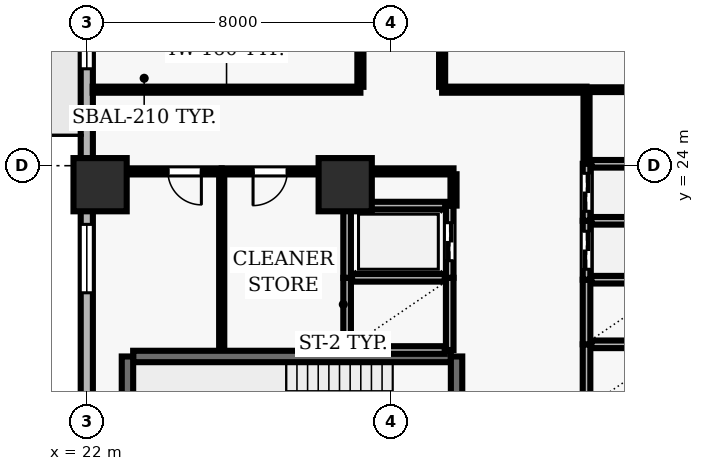
"""IFC4 building model, lengths in metres.
Left out: names, types, materials, properties, quantities, classifications, styles, units other than length and angle.
Written with IfcOpenShell. Run it as: python <this file> out.ifc"""

import sys

from ifc_helpers import new_model, si_unit, direction, frame, frame_2d, origin, origin_2d, place, context, subcontext, project, spatial, rectangle, extrude, element, fill, save


model = new_model("IFC4")
c1 = context("Model", 3, precision=1e-05, world=origin(), true_north=direction((0.0, 1.0)))
c2 = subcontext(c1, "Body", "Model", "MODEL_VIEW")
j1 = project(units=[si_unit("LENGTHUNIT", "METRE"), si_unit("PLANEANGLEUNIT", "RADIAN")], contexts=[c1])
p1 = place(None, origin())
s1 = spatial("IfcSite", under=j1, at=p1, CompositionType="ELEMENT")
p2 = place(p1, origin())
s2 = spatial("IfcBuilding", under=s1, at=p2, CompositionType="ELEMENT")
p3 = place(p2, frame((0.0, 0.0, 89.5)))
s3 = spatial("IfcBuildingStorey", under=s2, at=p3, CompositionType="ELEMENT", Elevation=89.5)
for number, where, z_axis, x_axis in (
    (1, (22.35, 23.5, 0.0), (0.0, 0.0, 1.0), (1.0, 0.0, 0.0)),
    (2, (28.8, 23.5, 0.0), (0.0, 0.0, 1.0), (1.0, 0.0, 0.0)),
):
    element("IfcColumn", number, at=place(p3, frame(where, z_axis=z_axis, x_axis=x_axis)), inside=s3, PredefinedType="COLUMN", context=c2, shape_type="SweptSolid", body=[
        extrude(rectangle(XDim=1.4, YDim=1.4, at=origin_2d()), origin(), (0.0, 0.0, 1.0), 3.9),
    ])
p4 = place(p3, frame((22.0, 51.5, 0.0), z_axis=(0.0, 0.0, 1.0), x_axis=(0.0, -1.0, 0.0)))
e3 = element("IfcWall", 3, at=p4, inside=s3, PredefinedType="SOLIDWALL", context=c2, shape_type="SweptSolid", body=[
    extrude(rectangle(XDim=49.0, YDim=0.32, at=frame_2d((24.5, 0.0))), origin(), (0.0, 0.0, 1.0), 3.64),
])
p5 = place(p4, frame((12.1, 0.0, 0.0)))
e4 = element("IfcOpeningElement", 4, at=p5, cuts=e3, PredefinedType="OPENING", context=c2, shape_type="SweptSolid", body=[
    extrude(rectangle(XDim=1.0, YDim=2.2, at=frame_2d((0.5, 1.1))), frame((0.0, 0.17, 0.0), z_axis=(0.0, -1.0, 0.0), x_axis=(1.0, 0.0, 0.0)), (0.0, 0.0, 1.0), 0.34),
])
p6 = place(p4, frame((1.822, 0.0, 0.9)))
e5 = element("IfcOpeningElement", 5, at=p6, cuts=e3, PredefinedType="OPENING", context=c2, shape_type="SweptSolid", body=[
    extrude(rectangle(XDim=1.8, YDim=2.2, at=frame_2d((0.9, 1.1))), frame((0.0, 0.17, 0.0), z_axis=(0.0, -1.0, 0.0), x_axis=(1.0, 0.0, 0.0)), (0.0, 0.0, 1.0), 0.34),
])
p7 = place(p4, frame((7.717, 0.0, 0.9)))
e6 = element("IfcOpeningElement", 6, at=p7, cuts=e3, PredefinedType="OPENING", context=c2, shape_type="SweptSolid", body=[
    extrude(rectangle(XDim=1.8, YDim=2.2, at=frame_2d((0.9, 1.1))), frame((0.0, 0.17, 0.0), z_axis=(0.0, -1.0, 0.0), x_axis=(1.0, 0.0, 0.0)), (0.0, 0.0, 1.0), 0.34),
])
p8 = place(p4, frame((18.156, 0.0, 0.9)))
e7 = element("IfcOpeningElement", 7, at=p8, cuts=e3, PredefinedType="OPENING", context=c2, shape_type="SweptSolid", body=[
    extrude(rectangle(XDim=1.8, YDim=2.2, at=frame_2d((0.9, 1.1))), frame((0.0, 0.17, 0.0), z_axis=(0.0, -1.0, 0.0), x_axis=(1.0, 0.0, 0.0)), (0.0, 0.0, 1.0), 0.34),
])
p9 = place(p4, frame((23.15, 0.0, 0.9)))
e8 = element("IfcOpeningElement", 8, at=p9, cuts=e3, PredefinedType="OPENING", context=c2, shape_type="SweptSolid", body=[
    extrude(rectangle(XDim=1.8, YDim=2.2, at=frame_2d((0.9, 1.1))), frame((0.0, 0.17, 0.0), z_axis=(0.0, -1.0, 0.0), x_axis=(1.0, 0.0, 0.0)), (0.0, 0.0, 1.0), 0.34),
])
p10 = place(p4, frame((29.044, 0.0, 0.9)))
e9 = element("IfcOpeningElement", 9, at=p10, cuts=e3, PredefinedType="OPENING", context=c2, shape_type="SweptSolid", body=[
    extrude(rectangle(XDim=1.8, YDim=2.2, at=frame_2d((0.9, 1.1))), frame((0.0, 0.17, 0.0), z_axis=(0.0, -1.0, 0.0), x_axis=(1.0, 0.0, 0.0)), (0.0, 0.0, 1.0), 0.34),
])
p11 = place(p4, frame((34.039, 0.0, 0.9)))
e10 = element("IfcOpeningElement", 10, at=p11, cuts=e3, PredefinedType="OPENING", context=c2, shape_type="SweptSolid", body=[
    extrude(rectangle(XDim=1.8, YDim=2.2, at=frame_2d((0.9, 1.1))), frame((0.0, 0.17, 0.0), z_axis=(0.0, -1.0, 0.0), x_axis=(1.0, 0.0, 0.0)), (0.0, 0.0, 1.0), 0.34),
])
p12 = place(p4, frame((39.933, 0.0, 0.9)))
e11 = element("IfcOpeningElement", 11, at=p12, cuts=e3, PredefinedType="OPENING", context=c2, shape_type="SweptSolid", body=[
    extrude(rectangle(XDim=1.8, YDim=2.2, at=frame_2d((0.9, 1.1))), frame((0.0, 0.17, 0.0), z_axis=(0.0, -1.0, 0.0), x_axis=(1.0, 0.0, 0.0)), (0.0, 0.0, 1.0), 0.34),
])
p13 = place(p3, frame((31.58, 18.98, 0.0), z_axis=(0.0, 0.0, 1.0), x_axis=(-1.0, 0.0, 0.0)))
e12 = element("IfcWall", 12, at=p13, inside=s3, PredefinedType="SHEAR", context=c2, shape_type="SweptSolid", body=[
    extrude(rectangle(XDim=8.36, YDim=0.3, at=frame_2d((4.18, 0.0))), origin(), (0.0, 0.0, 1.0), 3.64),
])
p14 = place(p3, frame((23.07, 18.98, 0.0), z_axis=(0.0, 0.0, 1.0), x_axis=(0.0, -1.0, 0.0)))
e13 = element("IfcWall", 13, at=p14, inside=s3, PredefinedType="SHEAR", context=c2, shape_type="SweptSolid", body=[
    extrude(rectangle(XDim=3.51, YDim=0.3, at=frame_2d((1.755, 0.0))), origin(), (0.0, 0.0, 1.0), 3.64),
])
p15 = place(p3, frame((31.73, 15.47, 0.0), z_axis=(0.0, 0.0, 1.0), x_axis=(0.0, 1.0, 0.0)))
e14 = element("IfcWall", 14, at=p15, inside=s3, PredefinedType="SHEAR", context=c2, shape_type="SweptSolid", body=[
    extrude(rectangle(XDim=3.51, YDim=0.3, at=frame_2d((1.755, 0.0))), origin(), (0.0, 0.0, 1.0), 3.64),
])
p16 = place(p15, frame((1.18, 0.0, 0.0)))
e15 = element("IfcOpeningElement", 15, at=p16, cuts=e14, PredefinedType="OPENING", context=c2, shape_type="SweptSolid", body=[
    extrude(rectangle(XDim=1.15, YDim=2.15, at=frame_2d((0.575, 1.075))), frame((0.0, 0.16, 0.0), z_axis=(0.0, -1.0, 0.0), x_axis=(1.0, 0.0, 0.0)), (0.0, 0.0, 1.0), 0.32),
])
p17 = place(p3, frame((35.15, 19.3, 0.0), z_axis=(0.0, 0.0, 1.0), x_axis=(0.0, -1.0, 0.0)))
e16 = element("IfcWall", 16, at=p17, inside=s3, PredefinedType="SOLIDWALL", context=c2, shape_type="SweptSolid", body=[
    extrude(rectangle(XDim=1.7, YDim=0.2, at=frame_2d((0.85, 0.0))), origin(), (0.0, 0.0, 1.0), 3.64),
])
p18 = place(p3, frame((37.42, 19.3, 0.0), z_axis=(0.0, 0.0, 1.0), x_axis=(-1.0, 0.0, 0.0)))
e17 = element("IfcWall", 17, at=p18, inside=s3, PredefinedType="SOLIDWALL", context=c2, shape_type="SweptSolid", body=[
    extrude(rectangle(XDim=2.14, YDim=0.2, at=frame_2d((1.07, 0.0))), origin(), (0.0, 0.0, 1.0), 3.64),
])
p19 = place(p3, frame((35.15, 21.0, 0.0), z_axis=(0.0, 0.0, 1.0), x_axis=(0.0, -1.0, 0.0)))
e18 = element("IfcWall", 18, at=p19, inside=s3, PredefinedType="SOLIDWALL", context=c2, shape_type="SweptSolid", body=[
    extrude(rectangle(XDim=1.7, YDim=0.2, at=frame_2d((0.85, 0.0))), origin(), (0.0, 0.0, 1.0), 3.64),
])
p20 = place(p3, frame((37.42, 21.0, 0.0), z_axis=(0.0, 0.0, 1.0), x_axis=(-1.0, 0.0, 0.0)))
e19 = element("IfcWall", 19, at=p20, inside=s3, PredefinedType="SOLIDWALL", context=c2, shape_type="SweptSolid", body=[
    extrude(rectangle(XDim=2.14, YDim=0.2, at=frame_2d((1.07, 0.0))), origin(), (0.0, 0.0, 1.0), 3.64),
])
for number, where, z_axis, x_axis in (
    (20, (28.85, 21.05, 0.0), (0.0, 0.0, 1.0), (0.0, -1.0, 0.0)),
    (21, (31.55, 19.15, 0.0), (0.0, 0.0, 1.0), (0.0, 1.0, 0.0)),
):
    element("IfcWall", number, at=place(p3, frame(where, z_axis=z_axis, x_axis=x_axis)), inside=s3, PredefinedType="SOLIDWALL", context=c2, shape_type="SweptSolid", body=[
        extrude(rectangle(XDim=1.9, YDim=0.2, at=frame_2d((0.95, 0.0))), origin(), (0.0, 0.0, 1.0), 3.64),
    ])
for number, where, z_axis, x_axis in (
    (22, (28.98, 19.15, 0.0), (0.0, 0.0, 1.0), (1.0, 0.0, 0.0)),
    (23, (31.42, 21.05, 0.0), (0.0, 0.0, 1.0), (-1.0, 0.0, 0.0)),
):
    element("IfcWall", number, at=place(p3, frame(where, z_axis=z_axis, x_axis=x_axis)), inside=s3, PredefinedType="SOLIDWALL", context=c2, shape_type="SweptSolid", body=[
        extrude(rectangle(XDim=2.44, YDim=0.2, at=frame_2d((1.22, 0.0))), origin(), (0.0, 0.0, 1.0), 3.64),
    ])
p21 = place(p3, frame((35.15, 22.55, 0.0), z_axis=(0.0, 0.0, 1.0), x_axis=(0.0, -1.0, 0.0)))
e24 = element("IfcWall", 24, at=p21, inside=s3, PredefinedType="SOLIDWALL", context=c2, shape_type="SweptSolid", body=[
    extrude(rectangle(XDim=1.55, YDim=0.2, at=frame_2d((0.775, 0.0))), origin(), (0.0, 0.0, 1.0), 3.64),
])
p22 = place(p21, frame((0.275, 0.0, 0.0)))
e25 = element("IfcOpeningElement", 25, at=p22, cuts=e24, PredefinedType="OPENING", context=c2, shape_type="SweptSolid", body=[
    extrude(rectangle(XDim=1.0, YDim=2.1, at=frame_2d((0.5, 1.05))), frame((0.0, 0.11, 0.0), z_axis=(0.0, -1.0, 0.0), x_axis=(1.0, 0.0, 0.0)), (0.0, 0.0, 1.0), 0.22),
])
p23 = place(p3, frame((37.42, 22.55, 0.0), z_axis=(0.0, 0.0, 1.0), x_axis=(-1.0, 0.0, 0.0)))
e26 = element("IfcWall", 26, at=p23, inside=s3, PredefinedType="SOLIDWALL", context=c2, shape_type="SweptSolid", body=[
    extrude(rectangle(XDim=2.14, YDim=0.2, at=frame_2d((1.07, 0.0))), origin(), (0.0, 0.0, 1.0), 3.64),
])
p24 = place(p3, frame((35.15, 24.05, 0.0), z_axis=(0.0, 0.0, 1.0), x_axis=(0.0, -1.0, 0.0)))
e27 = element("IfcWall", 27, at=p24, inside=s3, PredefinedType="SOLIDWALL", context=c2, shape_type="SweptSolid", body=[
    extrude(rectangle(XDim=1.5, YDim=0.2, at=frame_2d((0.75, 0.0))), origin(), (0.0, 0.0, 1.0), 3.64),
])
p25 = place(p24, frame((0.25, 0.0, 0.0)))
e28 = element("IfcOpeningElement", 28, at=p25, cuts=e27, PredefinedType="OPENING", context=c2, shape_type="SweptSolid", body=[
    extrude(rectangle(XDim=1.0, YDim=2.1, at=frame_2d((0.5, 1.05))), frame((0.0, 0.11, 0.0), z_axis=(0.0, -1.0, 0.0), x_axis=(1.0, 0.0, 0.0)), (0.0, 0.0, 1.0), 0.22),
])
p26 = place(p3, frame((37.42, 24.05, 0.0), z_axis=(0.0, 0.0, 1.0), x_axis=(-1.0, 0.0, 0.0)))
e29 = element("IfcWall", 29, at=p26, inside=s3, PredefinedType="SOLIDWALL", context=c2, shape_type="SweptSolid", body=[
    extrude(rectangle(XDim=2.14, YDim=0.2, at=frame_2d((1.07, 0.0))), origin(), (0.0, 0.0, 1.0), 3.64),
])
p27 = place(p3, frame((28.85, 22.95, 0.0), z_axis=(0.0, 0.0, 1.0), x_axis=(0.0, -1.0, 0.0)))
e30 = element("IfcWall", 30, at=p27, inside=s3, PredefinedType="SOLIDWALL", context=c2, shape_type="SweptSolid", body=[
    extrude(rectangle(XDim=1.9, YDim=0.2, at=frame_2d((0.95, 0.0))), origin(), (0.0, 0.0, 1.0), 3.64),
])
p28 = place(p3, frame((31.55, 21.05, 0.0), z_axis=(0.0, 0.0, 1.0), x_axis=(0.0, 1.0, 0.0)))
e31 = element("IfcWall", 31, at=p28, inside=s3, PredefinedType="SOLIDWALL", context=c2, shape_type="SweptSolid", body=[
    extrude(rectangle(XDim=1.9, YDim=0.2, at=frame_2d((0.95, 0.0))), origin(), (0.0, 0.0, 1.0), 3.64),
])
p29 = place(p28, frame((0.45, 0.0, 0.0)))
e32 = element("IfcOpeningElement", 32, at=p29, cuts=e31, PredefinedType="OPENING", context=c2, shape_type="SweptSolid", body=[
    extrude(rectangle(XDim=1.0, YDim=2.1, at=frame_2d((0.5, 1.05))), frame((0.0, 0.11, 0.0), z_axis=(0.0, -1.0, 0.0), x_axis=(1.0, 0.0, 0.0)), (0.0, 0.0, 1.0), 0.22),
])
p30 = place(p3, frame((31.43, 22.95, 0.0), z_axis=(0.0, 0.0, 1.0), x_axis=(-1.0, 0.0, 0.0)))
e33 = element("IfcWall", 33, at=p30, inside=s3, PredefinedType="SOLIDWALL", context=c2, shape_type="SweptSolid", body=[
    extrude(rectangle(XDim=2.46, YDim=0.2, at=frame_2d((1.23, 0.0))), origin(), (0.0, 0.0, 1.0), 3.64),
])
p31 = place(p3, frame((25.55, 23.85, 0.0), z_axis=(0.0, 0.0, 1.0), x_axis=(-1.0, 0.0, 0.0)))
e34 = element("IfcWall", 34, at=p31, inside=s3, PredefinedType="PARTITIONING", context=c2, shape_type="SweptSolid", body=[
    extrude(rectangle(XDim=3.35, YDim=0.16, at=frame_2d((1.675, 0.0))), origin(), (0.0, 0.0, 1.0), 3.005),
])
p32 = place(p31, frame((0.535, 0.0, 0.0)))
e35 = element("IfcOpeningElement", 35, at=p32, cuts=e34, PredefinedType="OPENING", context=c2, shape_type="SweptSolid", body=[
    extrude(rectangle(XDim=0.88, YDim=2.1, at=frame_2d((0.44, 1.05))), frame((0.0, 0.09, 0.0), z_axis=(0.0, -1.0, 0.0), x_axis=(1.0, 0.0, 0.0)), (0.0, 0.0, 1.0), 0.18),
])
p33 = place(p3, frame((28.8, 23.85, 0.0), z_axis=(0.0, 0.0, 1.0), x_axis=(-1.0, 0.0, 0.0)))
e36 = element("IfcWall", 36, at=p33, inside=s3, PredefinedType="PARTITIONING", context=c2, shape_type="SweptSolid", body=[
    extrude(rectangle(XDim=3.25, YDim=0.16, at=frame_2d((1.625, 0.0))), origin(), (0.0, 0.0, 1.0), 3.005),
])
p34 = place(p33, frame((1.525, 0.0, 0.0)))
e37 = element("IfcOpeningElement", 37, at=p34, cuts=e36, PredefinedType="OPENING", context=c2, shape_type="SweptSolid", body=[
    extrude(rectangle(XDim=0.9, YDim=2.1, at=frame_2d((0.45, 1.05))), frame((0.0, 0.09, 0.0), z_axis=(0.0, -1.0, 0.0), x_axis=(1.0, 0.0, 0.0)), (0.0, 0.0, 1.0), 0.18),
])
p35 = place(p3, frame((28.8, 23.85, 0.0), z_axis=(0.0, 0.0, 1.0), x_axis=(1.0, 0.0, 0.0)))
e38 = element("IfcWall", 38, at=p35, inside=s3, PredefinedType="PARTITIONING", context=c2, shape_type="SweptSolid", body=[
    extrude(rectangle(XDim=2.85, YDim=0.16, at=frame_2d((1.425, 0.0))), origin(), (0.0, 0.0, 1.0), 3.64),
])
p36 = place(p3, frame((29.2, 26.0, 0.0), z_axis=(0.0, 0.0, 1.0), x_axis=(-1.0, 0.0, 0.0)))
e39 = element("IfcWall", 39, at=p36, inside=s3, PredefinedType="PARTITIONING", context=c2, shape_type="SweptSolid", body=[
    extrude(rectangle(XDim=7.045, YDim=0.16, at=frame_2d((3.522, 0.0))), origin(), (0.0, 0.0, 1.0), 3.64),
])
p37 = place(p3, frame((35.15, 26.0, 0.0), z_axis=(0.0, 0.0, 1.0), x_axis=(-1.0, 0.0, 0.0)))
e40 = element("IfcWall", 40, at=p37, inside=s3, PredefinedType="PARTITIONING", context=c2, shape_type="SweptSolid", body=[
    extrude(rectangle(XDim=3.8, YDim=0.16, at=frame_2d((1.9, 0.0))), origin(), (0.0, 0.0, 1.0), 3.64),
])
p38 = place(p3, frame((35.15, 26.0, 0.0), z_axis=(0.0, 0.0, 1.0), x_axis=(1.0, 0.0, 0.0)))
e41 = element("IfcWall", 41, at=p38, inside=s3, PredefinedType="PARTITIONING", context=c2, shape_type="SweptSolid", body=[
    extrude(rectangle(XDim=2.695, YDim=0.125, at=frame_2d((1.348, 0.0))), origin(), (0.0, 0.0, 1.0), 3.64),
])
p39 = place(p3, frame((25.55, 19.16, 0.0), z_axis=(0.0, 0.0, 1.0), x_axis=(0.0, 1.0, 0.0)))
e42 = element("IfcWall", 42, at=p39, inside=s3, PredefinedType="PARTITIONING", context=c2, shape_type="SweptSolid", body=[
    extrude(rectangle(XDim=4.615, YDim=0.135, at=frame_2d((2.308, 0.0))), origin(), (0.0, 0.0, 1.0), 3.64),
])
p40 = place(p3, frame((28.8, 22.95, 0.0), z_axis=(0.0, 0.0, 1.0), x_axis=(0.0, 1.0, 0.0)))
e43 = element("IfcWall", 43, at=p40, inside=s3, PredefinedType="PARTITIONING", context=c2, shape_type="SweptSolid", body=[
    extrude(rectangle(XDim=0.825, YDim=0.125, at=frame_2d((0.413, 0.0))), origin(), (0.0, 0.0, 1.0), 3.64),
])
p41 = place(p3, frame((29.2, 35.742, 0.0), z_axis=(0.0, 0.0, 1.0), x_axis=(0.0, -1.0, 0.0)))
e44 = element("IfcWall", 44, at=p41, inside=s3, PredefinedType="PARTITIONING", context=c2, shape_type="SweptSolid", body=[
    extrude(rectangle(XDim=9.667, YDim=0.16, at=frame_2d((4.833, 0.0))), origin(), (0.0, 0.0, 1.0), 3.64),
])
p42 = place(p41, frame((4.383, 0.0, 0.0)))
e45 = element("IfcOpeningElement", 45, at=p42, cuts=e44, PredefinedType="OPENING", context=c2, shape_type="SweptSolid", body=[
    extrude(rectangle(XDim=0.9, YDim=2.1, at=frame_2d((0.45, 1.05))), frame((0.0, 0.09, 0.0), z_axis=(0.0, -1.0, 0.0), x_axis=(1.0, 0.0, 0.0)), (0.0, 0.0, 1.0), 0.18),
])
p43 = place(p3, frame((31.35, 26.075, 0.0), z_axis=(0.0, 0.0, 1.0), x_axis=(0.0, 1.0, 0.0)))
e46 = element("IfcWall", 46, at=p43, inside=s3, PredefinedType="PARTITIONING", context=c2, shape_type="SweptSolid", body=[
    extrude(rectangle(XDim=9.667, YDim=0.16, at=frame_2d((4.833, 0.0))), origin(), (0.0, 0.0, 1.0), 3.64),
])
p44 = place(p43, frame((4.383, 0.0, 0.0)))
e47 = element("IfcOpeningElement", 47, at=p44, cuts=e46, PredefinedType="OPENING", context=c2, shape_type="SweptSolid", body=[
    extrude(rectangle(XDim=0.9, YDim=2.1, at=frame_2d((0.45, 1.05))), frame((0.0, 0.09, 0.0), z_axis=(0.0, -1.0, 0.0), x_axis=(1.0, 0.0, 0.0)), (0.0, 0.0, 1.0), 0.18),
])
p45 = place(p3, frame((31.65, 23.775, 0.0), z_axis=(0.0, 0.0, 1.0), x_axis=(0.0, -1.0, 0.0)))
e48 = element("IfcWall", 48, at=p45, inside=s3, PredefinedType="PARTITIONING", context=c2, shape_type="SweptSolid", body=[
    extrude(rectangle(XDim=0.825, YDim=0.16, at=frame_2d((0.413, 0.0))), origin(), (0.0, 0.0, 1.0), 3.64),
])
p46 = place(p3, frame((35.15, 24.07, 0.0), z_axis=(0.0, 0.0, 1.0), x_axis=(0.0, 1.0, 0.0)))
e49 = element("IfcWall", 49, at=p46, inside=s3, PredefinedType="PARTITIONING", context=c2, shape_type="SweptSolid", body=[
    extrude(rectangle(XDim=1.855, YDim=0.16, at=frame_2d((0.927, 0.0))), origin(), (0.0, 0.0, 1.0), 3.64),
])
p47 = place(p9, origin())
e50 = element("IfcWindow", 50, at=p47, inside=s3, PartitioningType="SINGLE_PANEL", PredefinedType="WINDOW", context=c2, shape_type="SweptSolid", body=[
    extrude(rectangle(XDim=1.8, YDim=2.2, at=frame_2d((0.9, 1.1))), frame((0.0, 0.03, 0.0), z_axis=(0.0, -1.0, 0.0), x_axis=(1.0, 0.0, 0.0)), (0.0, 0.0, 1.0), 0.06),
])
fill(e8, e50)
p48 = place(p10, origin())
e51 = element("IfcWindow", 51, at=p48, inside=s3, PartitioningType="SINGLE_PANEL", PredefinedType="WINDOW", context=c2, shape_type="SweptSolid", body=[
    extrude(rectangle(XDim=1.8, YDim=2.2, at=frame_2d((0.9, 1.1))), frame((0.0, 0.03, 0.0), z_axis=(0.0, -1.0, 0.0), x_axis=(1.0, 0.0, 0.0)), (0.0, 0.0, 1.0), 0.06),
])
fill(e9, e51)
p49 = place(p22, origin())
e52 = element("IfcDoor", 52, at=p49, inside=s3, OperationType="DOUBLE_DOOR_SLIDING", PredefinedType="DOOR", context=c2, shape_type="SweptSolid", body=[
    extrude(rectangle(XDim=1.0, YDim=2.1, at=frame_2d((0.5, 1.05))), frame((0.0, 0.025, 0.0), z_axis=(0.0, -1.0, 0.0), x_axis=(1.0, 0.0, 0.0)), (0.0, 0.0, 1.0), 0.05),
])
fill(e25, e52)
p50 = place(p25, origin())
e53 = element("IfcDoor", 53, at=p50, inside=s3, OperationType="DOUBLE_DOOR_SLIDING", PredefinedType="DOOR", context=c2, shape_type="SweptSolid", body=[
    extrude(rectangle(XDim=1.0, YDim=2.1, at=frame_2d((0.5, 1.05))), frame((0.0, 0.025, 0.0), z_axis=(0.0, -1.0, 0.0), x_axis=(1.0, 0.0, 0.0)), (0.0, 0.0, 1.0), 0.05),
])
fill(e28, e53)
p51 = place(p29, origin())
e54 = element("IfcDoor", 54, at=p51, inside=s3, OperationType="DOUBLE_DOOR_SLIDING", PredefinedType="DOOR", context=c2, shape_type="SweptSolid", body=[
    extrude(rectangle(XDim=1.0, YDim=2.1, at=frame_2d((0.5, 1.05))), frame((0.0, 0.025, 0.0), z_axis=(0.0, -1.0, 0.0), x_axis=(1.0, 0.0, 0.0)), (0.0, 0.0, 1.0), 0.05),
])
fill(e32, e54)
p52 = place(p32, origin())
e55 = element("IfcDoor", 55, at=p52, inside=s3, OperationType="SINGLE_SWING_LEFT", PredefinedType="DOOR", context=c2, shape_type="SweptSolid", body=[
    extrude(rectangle(XDim=0.88, YDim=2.1, at=frame_2d((0.44, 1.05))), frame((0.0, 0.025, 0.0), z_axis=(0.0, -1.0, 0.0), x_axis=(1.0, 0.0, 0.0)), (0.0, 0.0, 1.0), 0.05),
])
fill(e35, e55)
p53 = place(p34, origin())
e56 = element("IfcDoor", 56, at=p53, inside=s3, OperationType="SINGLE_SWING_RIGHT", PredefinedType="DOOR", context=c2, shape_type="SweptSolid", body=[
    extrude(rectangle(XDim=0.9, YDim=2.1, at=frame_2d((0.45, 1.05))), frame((0.0, 0.025, 0.0), z_axis=(0.0, -1.0, 0.0), x_axis=(1.0, 0.0, 0.0)), (0.0, 0.0, 1.0), 0.05),
])
fill(e37, e56)
save(model, sys.argv[1])
